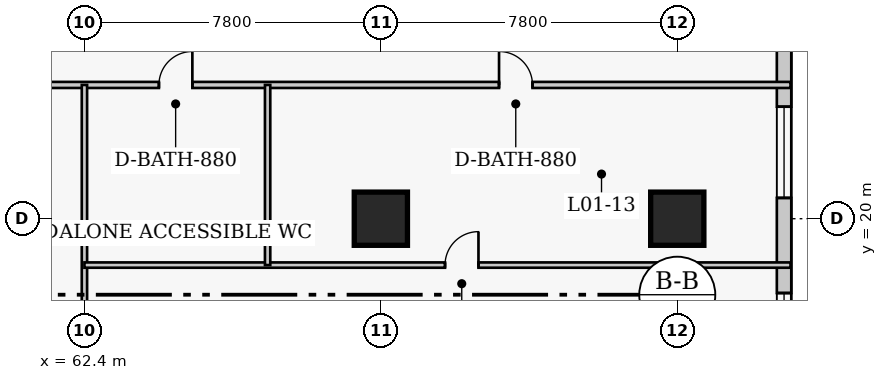
"""IFC4 building model, lengths in metres.
Left out: names, types, materials, properties, quantities, classifications, styles, units other than length and angle.
Written with IfcOpenShell. Run it as: python <this file> out.ifc"""

import sys

from ifc_helpers import new_model, si_unit, direction, frame, frame_2d, origin, origin_2d, place, context, subcontext, project, spatial, rectangle, extrude, element, fill, save


model = new_model("IFC4")
c1 = context("Model", 3, precision=1e-05, world=origin(), true_north=direction((0.0, 1.0)))
c2 = subcontext(c1, "Body", "Model", "MODEL_VIEW")
j1 = project(units=[si_unit("LENGTHUNIT", "METRE"), si_unit("PLANEANGLEUNIT", "RADIAN")], contexts=[c1])
p1 = place(None, origin())
s1 = spatial("IfcSite", under=j1, at=p1, CompositionType="ELEMENT")
p2 = place(p1, origin())
s2 = spatial("IfcBuilding", under=s1, at=p2, CompositionType="ELEMENT")
p3 = place(p2, frame((0.0, 0.0, 5.4)))
s3 = spatial("IfcBuildingStorey", under=s2, at=p3, CompositionType="ELEMENT", Elevation=5.4)
for number, where, z_axis, x_axis in (
    (1, (70.2, 20.0, 0.0), (0.0, 0.0, 1.0), (1.0, 0.0, 0.0)),
    (2, (78.0, 20.0, 0.0), (0.0, 0.0, 1.0), (1.0, 0.0, 0.0)),
):
    element("IfcColumn", number, at=place(p3, frame(where, z_axis=z_axis, x_axis=x_axis)), inside=s3, PredefinedType="COLUMN", context=c2, shape_type="SweptSolid", body=[
        extrude(rectangle(XDim=1.4, YDim=1.4, at=origin_2d()), origin(), (0.0, 0.0, 1.0), 5.0),
    ])
p4 = place(p3, frame((80.81, 2.61, 0.0), z_axis=(0.0, 0.0, 1.0), x_axis=(0.0, 1.0, 0.0)))
e3 = element("IfcWall", 3, at=p4, inside=s3, PredefinedType="SOLIDWALL", context=c2, shape_type="SweptSolid", body=[
    extrude(rectangle(XDim=46.78, YDim=0.38, at=frame_2d((23.39, 0.0))), origin(), (0.0, 0.0, 1.0), 4.65),
])
p5 = place(p4, frame((0.927, 0.0, 0.75)))
e4 = element("IfcOpeningElement", 4, at=p5, cuts=e3, PredefinedType="OPENING", context=c2, shape_type="SweptSolid", body=[
    extrude(rectangle(XDim=2.4, YDim=2.2, at=frame_2d((1.2, 1.1))), frame((0.0, 0.2, 0.0), z_axis=(0.0, -1.0, 0.0), x_axis=(1.0, 0.0, 0.0)), (0.0, 0.0, 1.0), 0.4),
])
p6 = place(p4, frame((5.179, 0.0, 0.75)))
e5 = element("IfcOpeningElement", 5, at=p6, cuts=e3, PredefinedType="OPENING", context=c2, shape_type="SweptSolid", body=[
    extrude(rectangle(XDim=2.4, YDim=2.2, at=frame_2d((1.2, 1.1))), frame((0.0, 0.2, 0.0), z_axis=(0.0, -1.0, 0.0), x_axis=(1.0, 0.0, 0.0)), (0.0, 0.0, 1.0), 0.4),
])
p7 = place(p4, frame((9.432, 0.0, 0.75)))
e6 = element("IfcOpeningElement", 6, at=p7, cuts=e3, PredefinedType="OPENING", context=c2, shape_type="SweptSolid", body=[
    extrude(rectangle(XDim=2.4, YDim=2.2, at=frame_2d((1.2, 1.1))), frame((0.0, 0.2, 0.0), z_axis=(0.0, -1.0, 0.0), x_axis=(1.0, 0.0, 0.0)), (0.0, 0.0, 1.0), 0.4),
])
p8 = place(p4, frame((13.034, 0.0, 0.75)))
e7 = element("IfcOpeningElement", 7, at=p8, cuts=e3, PredefinedType="OPENING", context=c2, shape_type="SweptSolid", body=[
    extrude(rectangle(XDim=2.4, YDim=2.2, at=frame_2d((1.2, 1.1))), frame((0.0, 0.2, 0.0), z_axis=(0.0, -1.0, 0.0), x_axis=(1.0, 0.0, 0.0)), (0.0, 0.0, 1.0), 0.4),
])
p9 = place(p4, frame((17.937, 0.0, 0.75)))
e8 = element("IfcOpeningElement", 8, at=p9, cuts=e3, PredefinedType="OPENING", context=c2, shape_type="SweptSolid", body=[
    extrude(rectangle(XDim=2.4, YDim=2.2, at=frame_2d((1.2, 1.1))), frame((0.0, 0.2, 0.0), z_axis=(0.0, -1.0, 0.0), x_axis=(1.0, 0.0, 0.0)), (0.0, 0.0, 1.0), 0.4),
])
p10 = place(p4, frame((26.443, 0.0, 0.75)))
e9 = element("IfcOpeningElement", 9, at=p10, cuts=e3, PredefinedType="OPENING", context=c2, shape_type="SweptSolid", body=[
    extrude(rectangle(XDim=2.4, YDim=2.2, at=frame_2d((1.2, 1.1))), frame((0.0, 0.2, 0.0), z_axis=(0.0, -1.0, 0.0), x_axis=(1.0, 0.0, 0.0)), (0.0, 0.0, 1.0), 0.4),
])
p11 = place(p4, frame((30.696, 0.0, 0.75)))
e10 = element("IfcOpeningElement", 10, at=p11, cuts=e3, PredefinedType="OPENING", context=c2, shape_type="SweptSolid", body=[
    extrude(rectangle(XDim=2.4, YDim=2.2, at=frame_2d((1.2, 1.1))), frame((0.0, 0.2, 0.0), z_axis=(0.0, -1.0, 0.0), x_axis=(1.0, 0.0, 0.0)), (0.0, 0.0, 1.0), 0.4),
])
p12 = place(p4, frame((34.948, 0.0, 0.75)))
e11 = element("IfcOpeningElement", 11, at=p12, cuts=e3, PredefinedType="OPENING", context=c2, shape_type="SweptSolid", body=[
    extrude(rectangle(XDim=2.4, YDim=2.2, at=frame_2d((1.2, 1.1))), frame((0.0, 0.2, 0.0), z_axis=(0.0, -1.0, 0.0), x_axis=(1.0, 0.0, 0.0)), (0.0, 0.0, 1.0), 0.4),
])
p13 = place(p4, frame((39.201, 0.0, 0.75)))
e12 = element("IfcOpeningElement", 12, at=p13, cuts=e3, PredefinedType="OPENING", context=c2, shape_type="SweptSolid", body=[
    extrude(rectangle(XDim=2.4, YDim=2.2, at=frame_2d((1.2, 1.1))), frame((0.0, 0.2, 0.0), z_axis=(0.0, -1.0, 0.0), x_axis=(1.0, 0.0, 0.0)), (0.0, 0.0, 1.0), 0.4),
])
p14 = place(p4, frame((43.454, 0.0, 0.75)))
e13 = element("IfcOpeningElement", 13, at=p14, cuts=e3, PredefinedType="OPENING", context=c2, shape_type="SweptSolid", body=[
    extrude(rectangle(XDim=2.4, YDim=2.2, at=frame_2d((1.2, 1.1))), frame((0.0, 0.2, 0.0), z_axis=(0.0, -1.0, 0.0), x_axis=(1.0, 0.0, 0.0)), (0.0, 0.0, 1.0), 0.4),
])
p15 = place(p3, frame((-2.98, 23.52, 0.0), z_axis=(0.0, 0.0, 1.0), x_axis=(1.0, 0.0, 0.0)))
e14 = element("IfcWall", 14, at=p15, inside=s3, PredefinedType="PARTITIONING", context=c2, shape_type="SweptSolid", body=[
    extrude(rectangle(XDim=83.96, YDim=0.16, at=frame_2d((41.98, 0.0))), origin(), (0.0, 0.0, 1.0), 4.65),
])
p16 = place(p15, frame((7.13, 0.0, 0.0)))
e15 = element("IfcOpeningElement", 15, at=p16, cuts=e14, PredefinedType="OPENING", context=c2, shape_type="SweptSolid", body=[
    extrude(rectangle(XDim=1.0, YDim=2.15, at=frame_2d((0.5, 1.075))), frame((0.0, 0.09, 0.0), z_axis=(0.0, -1.0, 0.0), x_axis=(1.0, 0.0, 0.0)), (0.0, 0.0, 1.0), 0.18),
])
p17 = place(p15, frame((11.96, 0.0, 0.0)))
e16 = element("IfcOpeningElement", 16, at=p17, cuts=e14, PredefinedType="OPENING", context=c2, shape_type="SweptSolid", body=[
    extrude(rectangle(XDim=1.1, YDim=2.15, at=frame_2d((0.55, 1.075))), frame((0.0, 0.09, 0.0), z_axis=(0.0, -1.0, 0.0), x_axis=(1.0, 0.0, 0.0)), (0.0, 0.0, 1.0), 0.18),
])
p18 = place(p15, frame((15.205, 0.0, 0.0)))
e17 = element("IfcOpeningElement", 17, at=p18, cuts=e14, PredefinedType="OPENING", context=c2, shape_type="SweptSolid", body=[
    extrude(rectangle(XDim=0.95, YDim=2.1, at=frame_2d((0.475, 1.05))), frame((0.0, 0.09, 0.0), z_axis=(0.0, -1.0, 0.0), x_axis=(1.0, 0.0, 0.0)), (0.0, 0.0, 1.0), 0.18),
])
p19 = place(p15, frame((28.63, 0.0, 0.0)))
e18 = element("IfcOpeningElement", 18, at=p19, cuts=e14, PredefinedType="OPENING", context=c2, shape_type="SweptSolid", body=[
    extrude(rectangle(XDim=2.2, YDim=2.4, at=frame_2d((1.1, 1.2))), frame((0.0, 0.09, 0.0), z_axis=(0.0, -1.0, 0.0), x_axis=(1.0, 0.0, 0.0)), (0.0, 0.0, 1.0), 0.18),
])
p20 = place(p15, frame((42.88, 0.0, 0.0)))
e19 = element("IfcOpeningElement", 19, at=p20, cuts=e14, PredefinedType="OPENING", context=c2, shape_type="SweptSolid", body=[
    extrude(rectangle(XDim=2.2, YDim=2.4, at=frame_2d((1.1, 1.2))), frame((0.0, 0.09, 0.0), z_axis=(0.0, -1.0, 0.0), x_axis=(1.0, 0.0, 0.0)), (0.0, 0.0, 1.0), 0.18),
])
p21 = place(p15, frame((57.08, 0.0, 0.0)))
e20 = element("IfcOpeningElement", 20, at=p21, cuts=e14, PredefinedType="OPENING", context=c2, shape_type="SweptSolid", body=[
    extrude(rectangle(XDim=2.2, YDim=2.4, at=frame_2d((1.1, 1.2))), frame((0.0, 0.09, 0.0), z_axis=(0.0, -1.0, 0.0), x_axis=(1.0, 0.0, 0.0)), (0.0, 0.0, 1.0), 0.18),
])
p22 = place(p15, frame((67.34, 0.0, 0.0)))
e21 = element("IfcOpeningElement", 21, at=p22, cuts=e14, PredefinedType="OPENING", context=c2, shape_type="SweptSolid", body=[
    extrude(rectangle(XDim=0.88, YDim=2.05, at=frame_2d((0.44, 1.025))), frame((0.0, 0.09, 0.0), z_axis=(0.0, -1.0, 0.0), x_axis=(1.0, 0.0, 0.0)), (0.0, 0.0, 1.0), 0.18),
])
p23 = place(p15, frame((76.29, 0.0, 0.0)))
e22 = element("IfcOpeningElement", 22, at=p23, cuts=e14, PredefinedType="OPENING", context=c2, shape_type="SweptSolid", body=[
    extrude(rectangle(XDim=0.88, YDim=2.05, at=frame_2d((0.44, 1.025))), frame((0.0, 0.09, 0.0), z_axis=(0.0, -1.0, 0.0), x_axis=(1.0, 0.0, 0.0)), (0.0, 0.0, 1.0), 0.18),
])
p24 = place(p3, frame((62.4, 0.42, 0.0), z_axis=(0.0, 0.0, 1.0), x_axis=(0.0, 1.0, 0.0)))
e23 = element("IfcWall", 23, at=p24, inside=s3, PredefinedType="PLUMBINGWALL", context=c2, shape_type="SweptSolid", body=[
    extrude(rectangle(XDim=23.1, YDim=0.14, at=frame_2d((11.55, 0.0))), origin(), (0.0, 0.0, 1.0), 3.9),
])
p25 = place(p3, frame((62.4, 18.78, 0.0), z_axis=(0.0, 0.0, 1.0), x_axis=(1.0, 0.0, 0.0)))
e24 = element("IfcWall", 24, at=p25, inside=s3, PredefinedType="PLUMBINGWALL", context=c2, shape_type="SweptSolid", body=[
    extrude(rectangle(XDim=18.58, YDim=0.14, at=frame_2d((9.29, 0.0))), origin(), (0.0, 0.0, 1.0), 4.65),
])
p26 = place(p25, frame((9.489, 0.0, 0.0)))
e25 = element("IfcOpeningElement", 25, at=p26, cuts=e24, PredefinedType="OPENING", context=c2, shape_type="SweptSolid", body=[
    extrude(rectangle(XDim=0.88, YDim=2.05, at=frame_2d((0.44, 1.025))), frame((0.0, 0.08, 0.0), z_axis=(0.0, -1.0, 0.0), x_axis=(1.0, 0.0, 0.0)), (0.0, 0.0, 1.0), 0.16),
])
p27 = place(p3, frame((67.22, 18.78, 0.0), z_axis=(0.0, 0.0, 1.0), x_axis=(0.0, 1.0, 0.0)))
e26 = element("IfcWall", 26, at=p27, inside=s3, PredefinedType="PLUMBINGWALL", context=c2, shape_type="SweptSolid", body=[
    extrude(rectangle(XDim=4.74, YDim=0.14, at=frame_2d((2.37, 0.0))), origin(), (0.0, 0.0, 1.0), 4.65),
])
p28 = place(p8, origin())
e27 = element("IfcWindow", 27, at=p28, inside=s3, PartitioningType="SINGLE_PANEL", PredefinedType="WINDOW", context=c2, shape_type="SweptSolid", body=[
    extrude(rectangle(XDim=2.4, YDim=2.2, at=frame_2d((1.2, 1.1))), frame((0.0, 0.03, 0.0), z_axis=(0.0, -1.0, 0.0), x_axis=(1.0, 0.0, 0.0)), (0.0, 0.0, 1.0), 0.06),
])
fill(e7, e27)
p29 = place(p9, origin())
e28 = element("IfcWindow", 28, at=p29, inside=s3, PartitioningType="SINGLE_PANEL", PredefinedType="WINDOW", context=c2, shape_type="SweptSolid", body=[
    extrude(rectangle(XDim=2.4, YDim=2.2, at=frame_2d((1.2, 1.1))), frame((0.0, 0.03, 0.0), z_axis=(0.0, -1.0, 0.0), x_axis=(1.0, 0.0, 0.0)), (0.0, 0.0, 1.0), 0.06),
])
fill(e8, e28)
p30 = place(p22, origin())
e29 = element("IfcDoor", 29, at=p30, inside=s3, OperationType="SINGLE_SWING_RIGHT", PredefinedType="DOOR", context=c2, shape_type="SweptSolid", body=[
    extrude(rectangle(XDim=0.88, YDim=2.05, at=frame_2d((0.44, 1.025))), frame((0.0, 0.025, 0.0), z_axis=(0.0, -1.0, 0.0), x_axis=(1.0, 0.0, 0.0)), (0.0, 0.0, 1.0), 0.05),
])
fill(e21, e29)
p31 = place(p23, origin())
e30 = element("IfcDoor", 30, at=p31, inside=s3, OperationType="SINGLE_SWING_LEFT", PredefinedType="DOOR", context=c2, shape_type="SweptSolid", body=[
    extrude(rectangle(XDim=0.88, YDim=2.05, at=frame_2d((0.44, 1.025))), frame((0.0, 0.025, 0.0), z_axis=(0.0, -1.0, 0.0), x_axis=(1.0, 0.0, 0.0)), (0.0, 0.0, 1.0), 0.05),
])
fill(e22, e30)
p32 = place(p26, origin())
e31 = element("IfcDoor", 31, at=p32, inside=s3, OperationType="SINGLE_SWING_RIGHT", PredefinedType="DOOR", context=c2, shape_type="SweptSolid", body=[
    extrude(rectangle(XDim=0.88, YDim=2.05, at=frame_2d((0.44, 1.025))), frame((0.0, 0.025, 0.0), z_axis=(0.0, -1.0, 0.0), x_axis=(1.0, 0.0, 0.0)), (0.0, 0.0, 1.0), 0.05),
])
fill(e25, e31)
save(model, sys.argv[1])
